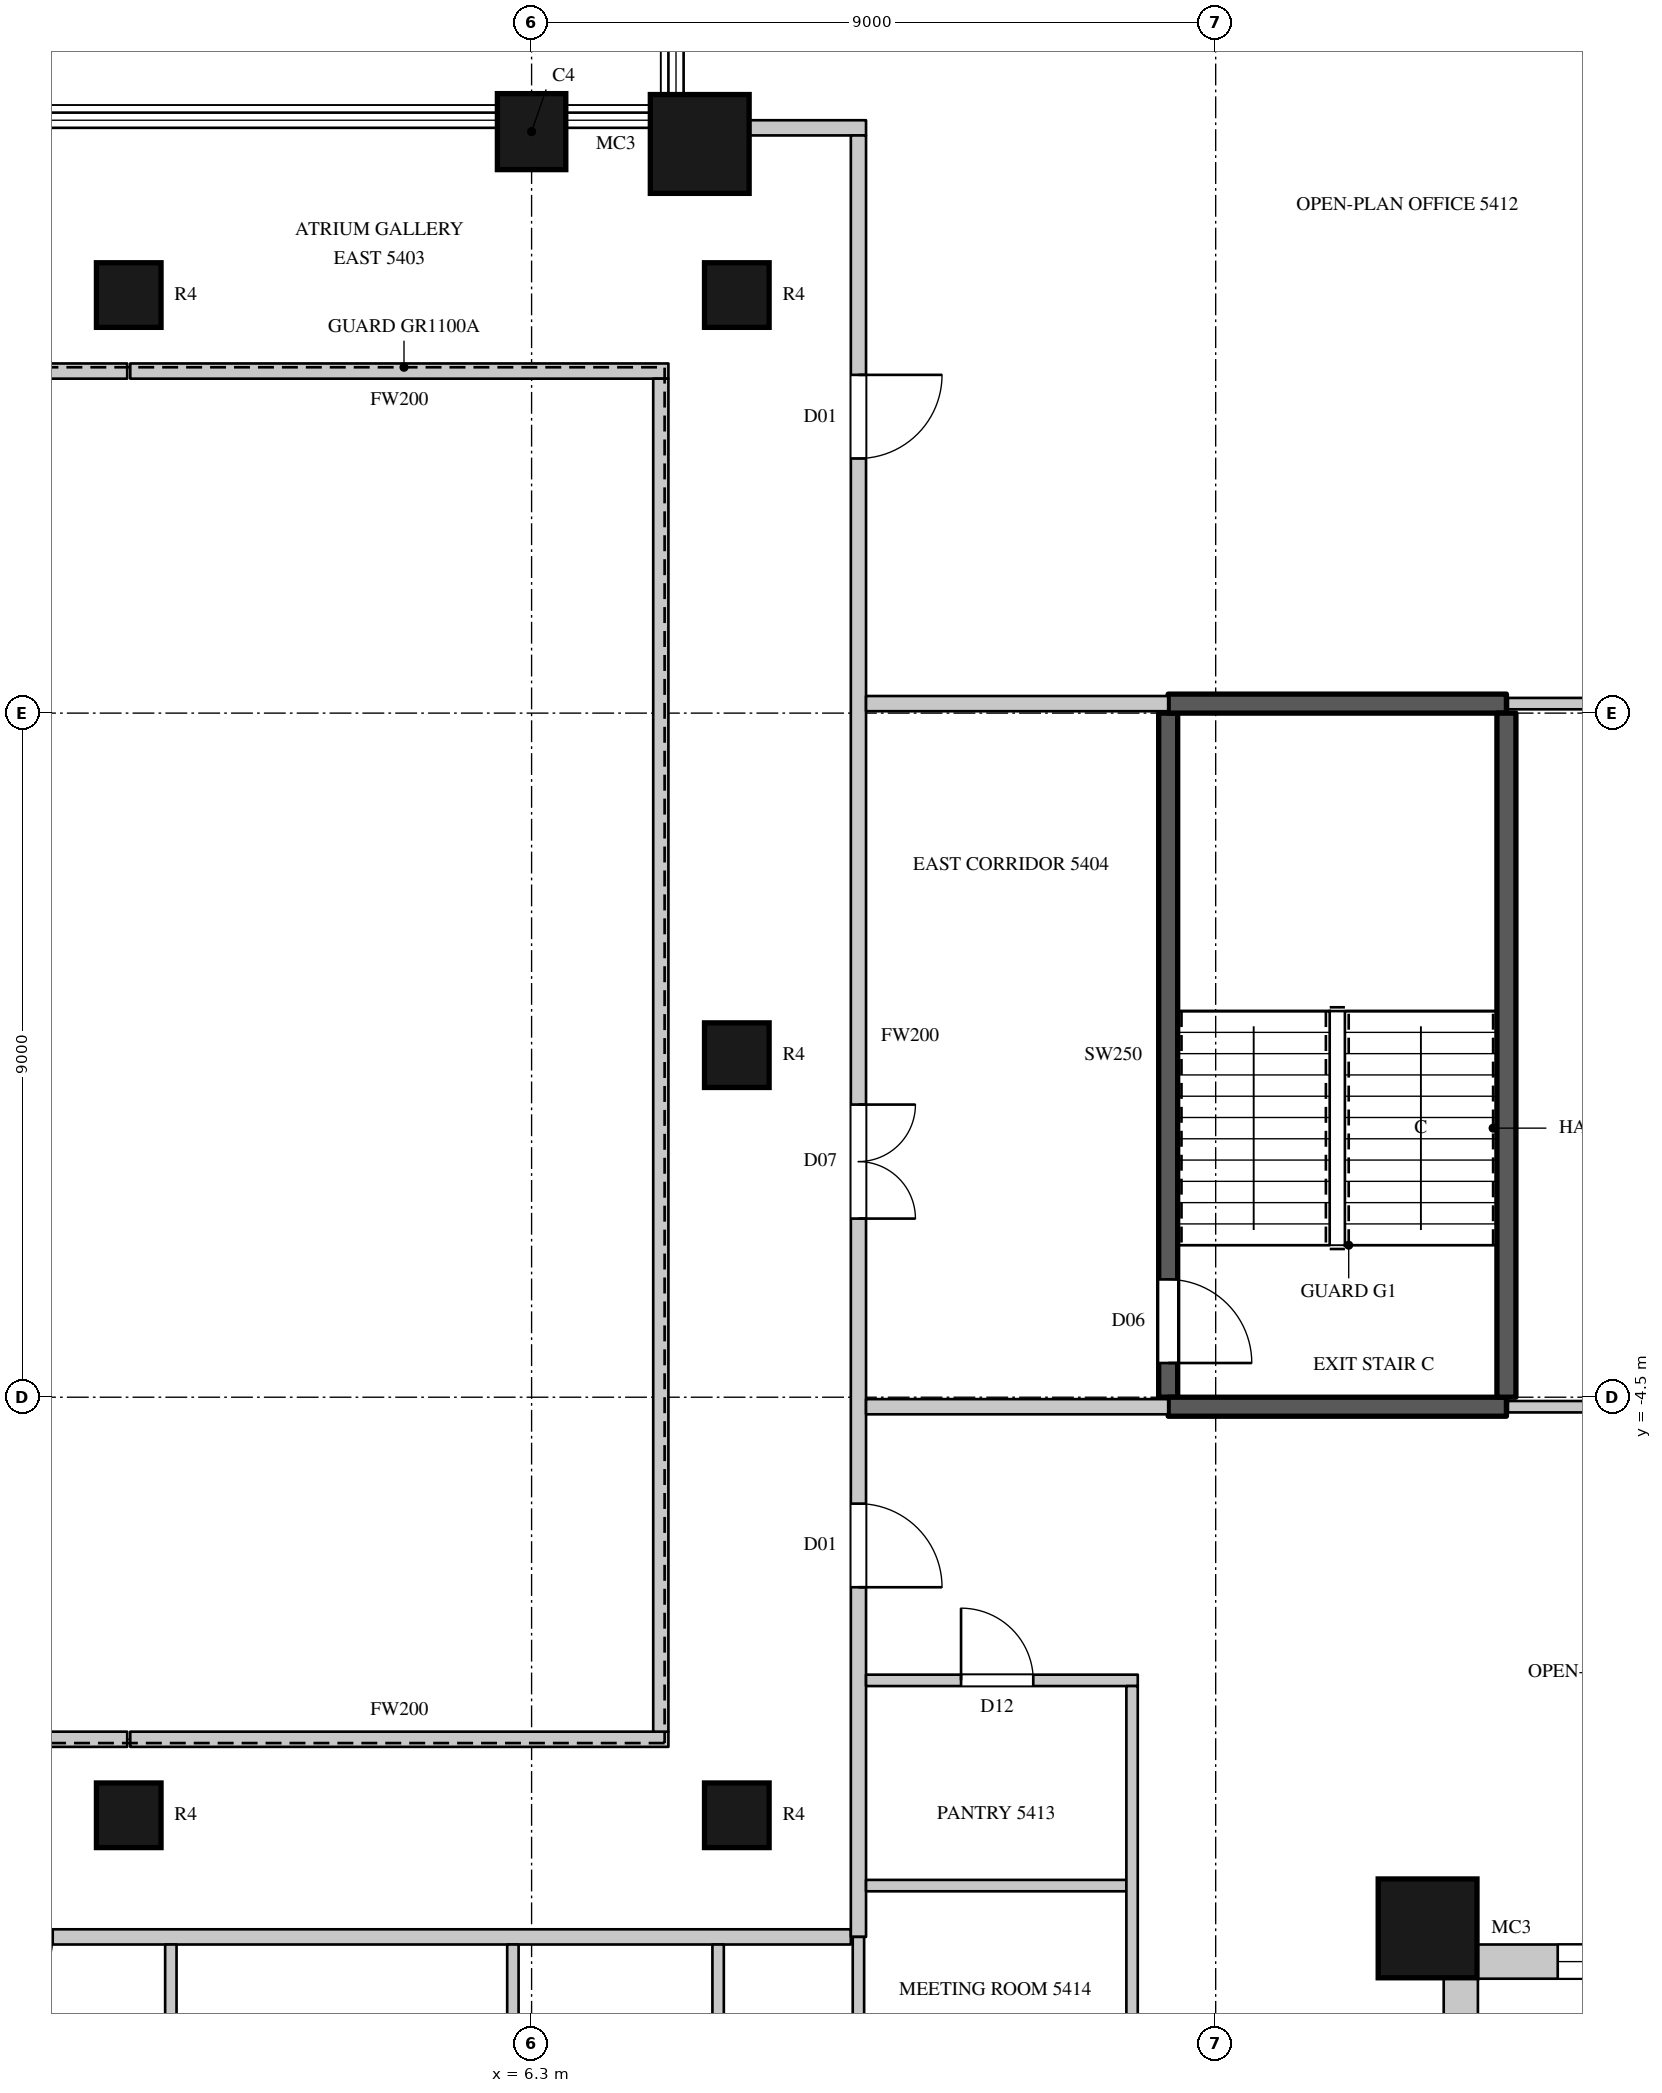
"""IFC4 building model, lengths in metres.
Left out: names, types, materials, properties, quantities, classifications, styles, units other than length and angle.
Written with IfcOpenShell. Run it as: python <this file> out.ifc"""

import sys

from ifc_helpers import new_model, si_unit, direction, frame, frame_2d, origin, origin_2d, place, context, subcontext, project, spatial, rectangle, circle, extrude, element, fill, save


model = new_model("IFC4")
c1 = context("Model", 3, precision=1e-05, world=origin(), true_north=direction((0.0, 1.0)))
c2 = subcontext(c1, "Body", "Model", "MODEL_VIEW")
j1 = project(units=[si_unit("LENGTHUNIT", "METRE"), si_unit("PLANEANGLEUNIT", "RADIAN")], contexts=[c1])
p1 = place(None, origin())
s1 = spatial("IfcSite", under=j1, at=p1, CompositionType="ELEMENT")
p2 = place(p1, origin())
s2 = spatial("IfcBuilding", under=s1, at=p2, CompositionType="ELEMENT")
p3 = place(p2, frame((0.0, 0.0, 243.4)))
s3 = spatial("IfcBuildingStorey", under=s2, at=p3, CompositionType="ELEMENT", Elevation=243.4)
p4 = place(p3, frame((8.512, 11.988, 0.0), z_axis=(0.0, 0.0, 1.0), x_axis=(1.0, 0.0, 0.0)))
e1 = element("IfcColumn", 1, at=p4, inside=s3, PredefinedType="COLUMN", context=c2, shape_type="SweptSolid", body=[
    extrude(circle(Radius=0.65, at=origin_2d()), origin(), (0.0, 0.0, 1.0), 4.1),
])
p5 = place(p3, frame((6.3, 12.15, 0.0), z_axis=(0.0, 0.0, 1.0), x_axis=(-1.0, 0.0, 0.0)))
e2 = element("IfcColumn", 2, at=p5, inside=s3, PredefinedType="COLUMN", context=c2, shape_type="SweptSolid", body=[
    extrude(rectangle(XDim=0.9, YDim=1.0, at=origin_2d()), origin(), (0.0, 0.0, 1.0), 4.1),
])
p6 = place(p3, frame((18.088, -11.488, 0.0), z_axis=(0.0, 0.0, 1.0), x_axis=(1.0, 0.0, 0.0)))
e3 = element("IfcColumn", 3, at=p6, inside=s3, PredefinedType="COLUMN", context=c2, shape_type="SweptSolid", body=[
    extrude(circle(Radius=0.65, at=origin_2d()), origin(), (0.0, 0.0, 1.0), 4.1),
])
for number, where, z_axis, x_axis in (
    (4, (1.0, -10.0, 0.0), (0.0, 0.0, 1.0), (1.0, 0.0, 0.0)),
    (5, (1.0, 10.0, 0.0), (0.0, 0.0, 1.0), (1.0, 0.0, 0.0)),
    (6, (9.0, -10.0, 0.0), (0.0, 0.0, 1.0), (1.0, 0.0, 0.0)),
    (7, (9.0, 0.0, 0.0), (0.0, 0.0, 1.0), (1.0, 0.0, 0.0)),
    (8, (9.0, 10.0, 0.0), (0.0, 0.0, 1.0), (1.0, 0.0, 0.0)),
):
    element("IfcColumn", number, at=place(p3, frame(where, z_axis=z_axis, x_axis=x_axis)), inside=s3, PredefinedType="COLUMN", context=c2, shape_type="SweptSolid", body=[
        extrude(circle(Radius=0.425, at=origin_2d()), origin(), (0.0, 0.0, 1.0), 4.1),
    ])
p7 = place(p3, frame((18.525, -16.304, 0.0), z_axis=(0.0, 0.0, 1.0), x_axis=(0.0, 1.0, 0.0)))
e9 = element("IfcWall", 9, at=p7, inside=s3, PredefinedType="SOLIDWALL", context=c2, shape_type="SweptSolid", body=[
    extrude(rectangle(XDim=4.202, YDim=0.45, at=frame_2d((2.101, 0.0))), origin(), (0.0, 0.0, 1.0), 3.8),
])
p8 = place(p7, frame((0.541, 0.0, 1.05)))
e10 = element("IfcOpeningElement", 10, at=p8, cuts=e9, PredefinedType="OPENING", context=c2, shape_type="SweptSolid", body=[
    extrude(rectangle(XDim=3.0, YDim=2.4, at=frame_2d((1.5, 1.2))), frame((0.0, 0.235, 0.0), z_axis=(0.0, -1.0, 0.0), x_axis=(1.0, 0.0, 0.0)), (0.0, 0.0, 1.0), 0.47),
])
p9 = place(p3, frame((18.701, -11.925, 0.0), z_axis=(0.0, 0.0, 1.0), x_axis=(1.0, 0.0, 0.0)))
e11 = element("IfcWall", 11, at=p9, inside=s3, PredefinedType="SOLIDWALL", context=c2, shape_type="SweptSolid", body=[
    extrude(rectangle(XDim=4.962, YDim=0.45, at=frame_2d((2.481, 0.0))), origin(), (0.0, 0.0, 1.0), 3.8),
])
p10 = place(p9, frame((1.098, 0.0, 1.05)))
e12 = element("IfcOpeningElement", 12, at=p10, cuts=e11, PredefinedType="OPENING", context=c2, shape_type="SweptSolid", body=[
    extrude(rectangle(XDim=3.0, YDim=2.4, at=frame_2d((1.5, 1.2))), frame((0.0, 0.235, 0.0), z_axis=(0.0, -1.0, 0.0), x_axis=(1.0, 0.0, 0.0)), (0.0, 0.0, 1.0), 0.47),
])
p11 = place(p3, frame((-10.9, -11.6, 0.0), z_axis=(0.0, 0.0, 1.0), x_axis=(1.0, 0.0, 0.0)))
e13 = element("IfcWall", 13, at=p11, inside=s3, PredefinedType="PARTITIONING", context=c2, shape_type="SweptSolid", body=[
    extrude(rectangle(XDim=21.4, YDim=0.2, at=frame_2d((10.7, 0.0))), origin(), (0.0, 0.0, 1.0), 3.8),
])
p12 = place(p11, frame((0.95, 0.0, 0.0)))
e14 = element("IfcOpeningElement", 14, at=p12, cuts=e13, PredefinedType="OPENING", context=c2, shape_type="SweptSolid", body=[
    extrude(rectangle(XDim=0.9, YDim=2.2, at=frame_2d((0.45, 1.1))), frame((0.0, 0.11, 0.0), z_axis=(0.0, -1.0, 0.0), x_axis=(1.0, 0.0, 0.0)), (0.0, 0.0, 1.0), 0.22),
])
p13 = place(p11, frame((4.2, 0.0, 0.0)))
e15 = element("IfcOpeningElement", 15, at=p13, cuts=e13, PredefinedType="OPENING", context=c2, shape_type="SweptSolid", body=[
    extrude(rectangle(XDim=0.9, YDim=2.2, at=frame_2d((0.45, 1.1))), frame((0.0, 0.11, 0.0), z_axis=(0.0, -1.0, 0.0), x_axis=(1.0, 0.0, 0.0)), (0.0, 0.0, 1.0), 0.22),
])
p14 = place(p11, frame((6.85, 0.0, 0.0)))
e16 = element("IfcOpeningElement", 16, at=p14, cuts=e13, PredefinedType="OPENING", context=c2, shape_type="SweptSolid", body=[
    extrude(rectangle(XDim=1.1, YDim=2.4, at=frame_2d((0.55, 1.2))), frame((0.0, 0.11, 0.0), z_axis=(0.0, -1.0, 0.0), x_axis=(1.0, 0.0, 0.0)), (0.0, 0.0, 1.0), 0.22),
])
p15 = place(p11, frame((9.8, 0.0, 0.0)))
e17 = element("IfcOpeningElement", 17, at=p15, cuts=e13, PredefinedType="OPENING", context=c2, shape_type="SweptSolid", body=[
    extrude(rectangle(XDim=1.1, YDim=2.4, at=frame_2d((0.55, 1.2))), frame((0.0, 0.11, 0.0), z_axis=(0.0, -1.0, 0.0), x_axis=(1.0, 0.0, 0.0)), (0.0, 0.0, 1.0), 0.22),
])
for number, where, z_axis, x_axis in (
    (18, (-6.1, -9.0, 0.0), (0.0, 0.0, 1.0), (1.0, 0.0, 0.0)),
    (19, (-6.1, 9.0, 0.0), (0.0, 0.0, 1.0), (1.0, 0.0, 0.0)),
    (20, (1.02, -9.0, 0.0), (0.0, 0.0, 1.0), (1.0, 0.0, 0.0)),
    (21, (1.02, 9.0, 0.0), (0.0, 0.0, 1.0), (1.0, 0.0, 0.0)),
):
    element("IfcWall", number, at=place(p3, frame(where, z_axis=z_axis, x_axis=x_axis)), inside=s3, PredefinedType="PARTITIONING", context=c2, shape_type="SweptSolid", body=[
        extrude(rectangle(XDim=7.08, YDim=0.2, at=frame_2d((3.54, 0.0))), origin(), (0.0, 0.0, 1.0), 3.8),
    ])
p16 = place(p3, frame((8.0, -8.9, 0.0), z_axis=(0.0, 0.0, 1.0), x_axis=(0.0, 1.0, 0.0)))
e22 = element("IfcWall", 22, at=p16, inside=s3, PredefinedType="PARTITIONING", context=c2, shape_type="SweptSolid", body=[
    extrude(rectangle(XDim=17.8, YDim=0.2, at=frame_2d((8.9, 0.0))), origin(), (0.0, 0.0, 1.0), 3.8),
])
p17 = place(p3, frame((9.144, 12.2, 0.0), z_axis=(0.0, 0.0, 1.0), x_axis=(1.0, 0.0, 0.0)))
e23 = element("IfcWall", 23, at=p17, inside=s3, PredefinedType="PARTITIONING", context=c2, shape_type="SweptSolid", body=[
    extrude(rectangle(XDim=1.556, YDim=0.2, at=frame_2d((0.778, 0.0))), origin(), (0.0, 0.0, 1.0), 3.8),
])
p18 = place(p3, frame((10.6, -11.6, 0.0), z_axis=(0.0, 0.0, 1.0), x_axis=(0.0, 1.0, 0.0)))
e24 = element("IfcWall", 24, at=p18, inside=s3, PredefinedType="PARTITIONING", context=c2, shape_type="SweptSolid", body=[
    extrude(rectangle(XDim=23.7, YDim=0.2, at=frame_2d((11.85, 0.0))), origin(), (0.0, 0.0, 1.0), 3.8),
])
p19 = place(p18, frame((9.45, 0.0, 0.0)))
e25 = element("IfcOpeningElement", 25, at=p19, cuts=e24, PredefinedType="OPENING", context=c2, shape_type="SweptSolid", body=[
    extrude(rectangle(XDim=1.5, YDim=2.4, at=frame_2d((0.75, 1.2))), frame((0.0, 0.11, 0.0), z_axis=(0.0, -1.0, 0.0), x_axis=(1.0, 0.0, 0.0)), (0.0, 0.0, 1.0), 0.22),
])
p20 = place(p18, frame((19.45, 0.0, 0.0)))
e26 = element("IfcOpeningElement", 26, at=p20, cuts=e24, PredefinedType="OPENING", context=c2, shape_type="SweptSolid", body=[
    extrude(rectangle(XDim=1.1, YDim=2.4, at=frame_2d((0.55, 1.2))), frame((0.0, 0.11, 0.0), z_axis=(0.0, -1.0, 0.0), x_axis=(1.0, 0.0, 0.0)), (0.0, 0.0, 1.0), 0.22),
])
p21 = place(p18, frame((4.6, 0.0, 0.0)))
e27 = element("IfcOpeningElement", 27, at=p21, cuts=e24, PredefinedType="OPENING", context=c2, shape_type="SweptSolid", body=[
    extrude(rectangle(XDim=1.1, YDim=2.4, at=frame_2d((0.55, 1.2))), frame((0.0, 0.11, 0.0), z_axis=(0.0, -1.0, 0.0), x_axis=(1.0, 0.0, 0.0)), (0.0, 0.0, 1.0), 0.22),
])
for number, where, z_axis, x_axis in (
    (28, (10.7, -4.625, 0.0), (0.0, 0.0, 1.0), (1.0, 0.0, 0.0)),
    (29, (10.7, 4.625, 0.0), (0.0, 0.0, 1.0), (1.0, 0.0, 0.0)),
):
    element("IfcWall", number, at=place(p3, frame(where, z_axis=z_axis, x_axis=x_axis)), inside=s3, PredefinedType="PARTITIONING", context=c2, shape_type="SweptSolid", body=[
        extrude(rectangle(XDim=3.975, YDim=0.2, at=frame_2d((1.988, 0.0))), origin(), (0.0, 0.0, 1.0), 3.8),
    ])
p22 = place(p3, frame((1.554, -15.425, 0.0), z_axis=(0.0, 0.0, 1.0), x_axis=(0.0, 1.0, 0.0)))
e30 = element("IfcWall", 30, at=p22, inside=s3, PredefinedType="PARTITIONING", context=c2, shape_type="SweptSolid", body=[
    extrude(rectangle(XDim=3.725, YDim=0.15, at=frame_2d((1.863, 0.0))), origin(), (0.0, 0.0, 1.0), 3.8),
])
p23 = place(p22, frame((0.15, 0.0, 0.0)))
e31 = element("IfcOpeningElement", 31, at=p23, cuts=e30, PredefinedType="OPENING", context=c2, shape_type="SweptSolid", body=[
    extrude(rectangle(XDim=0.95, YDim=2.2, at=frame_2d((0.475, 1.1))), frame((0.0, 0.085, 0.0), z_axis=(0.0, -1.0, 0.0), x_axis=(1.0, 0.0, 0.0)), (0.0, 0.0, 1.0), 0.17),
])
for number, where, z_axis, x_axis in (
    (32, (6.054, -15.425, 0.0), (0.0, 0.0, 1.0), (0.0, 1.0, 0.0)),
    (33, (8.754, -15.425, 0.0), (0.0, 0.0, 1.0), (0.0, 1.0, 0.0)),
):
    element("IfcWall", number, at=place(p3, frame(where, z_axis=z_axis, x_axis=x_axis)), inside=s3, PredefinedType="PARTITIONING", context=c2, shape_type="SweptSolid", body=[
        extrude(rectangle(XDim=3.725, YDim=0.15, at=frame_2d((1.863, 0.0))), origin(), (0.0, 0.0, 1.0), 3.8),
    ])
p24 = place(p3, frame((10.6, -20.864, 0.0), z_axis=(0.0, 0.0, 1.0), x_axis=(0.0, 1.0, 0.0)))
e34 = element("IfcWall", 34, at=p24, inside=s3, PredefinedType="PARTITIONING", context=c2, shape_type="SweptSolid", body=[
    extrude(rectangle(XDim=9.264, YDim=0.15, at=frame_2d((4.632, 0.0))), origin(), (0.0, 0.0, 1.0), 3.8),
])
p25 = place(p3, frame((10.7, -10.925, 0.0), z_axis=(0.0, 0.0, 1.0), x_axis=(1.0, 0.0, 0.0)))
e35 = element("IfcWall", 35, at=p25, inside=s3, PredefinedType="PARTITIONING", context=c2, shape_type="SweptSolid", body=[
    extrude(rectangle(XDim=3.425, YDim=0.15, at=frame_2d((1.712, 0.0))), origin(), (0.0, 0.0, 1.0), 3.8),
])
p26 = place(p3, frame((10.7, -8.225, 0.0), z_axis=(0.0, 0.0, 1.0), x_axis=(1.0, 0.0, 0.0)))
e36 = element("IfcWall", 36, at=p26, inside=s3, PredefinedType="PARTITIONING", context=c2, shape_type="SweptSolid", body=[
    extrude(rectangle(XDim=3.575, YDim=0.15, at=frame_2d((1.788, 0.0))), origin(), (0.0, 0.0, 1.0), 3.15),
])
p27 = place(p26, frame((1.25, 0.0, 0.0)))
e37 = element("IfcOpeningElement", 37, at=p27, cuts=e36, PredefinedType="OPENING", context=c2, shape_type="SweptSolid", body=[
    extrude(rectangle(XDim=0.95, YDim=2.2, at=frame_2d((0.475, 1.1))), frame((0.0, 0.085, 0.0), z_axis=(0.0, -1.0, 0.0), x_axis=(1.0, 0.0, 0.0)), (0.0, 0.0, 1.0), 0.17),
])
p28 = place(p3, frame((14.2, -14.45, 0.0), z_axis=(0.0, 0.0, 1.0), x_axis=(0.0, 1.0, 0.0)))
e38 = element("IfcWall", 38, at=p28, inside=s3, PredefinedType="PARTITIONING", context=c2, shape_type="SweptSolid", body=[
    extrude(rectangle(XDim=6.15, YDim=0.15, at=frame_2d((3.075, 0.0))), origin(), (0.0, 0.0, 1.0), 3.8),
])
for number, where, z_axis, x_axis in (
    (39, (19.145, -4.625, 0.0), (0.0, 0.0, 1.0), (1.0, 0.0, 0.0)),
    (40, (19.145, 4.625, 0.0), (0.0, 0.0, 1.0), (1.0, 0.0, 0.0)),
):
    element("IfcWall", number, at=place(p3, frame(where, z_axis=z_axis, x_axis=x_axis)), inside=s3, PredefinedType="PARTITIONING", context=c2, shape_type="SweptSolid", body=[
        extrude(rectangle(XDim=4.605, YDim=0.15, at=frame_2d((2.302, 0.0))), origin(), (0.0, 0.0, 1.0), 3.8),
    ])
p29 = place(p3, frame((14.675, -4.5, 0.0), z_axis=(0.0, 0.0, 1.0), x_axis=(0.0, 1.0, 0.0)))
e41 = element("IfcWall", 41, at=p29, inside=s3, PredefinedType="SHEAR", context=c2, shape_type="SweptSolid", body=[
    extrude(rectangle(XDim=9.0, YDim=0.25, at=frame_2d((4.5, 0.0))), origin(), (0.0, 0.0, 1.0), 3.8),
])
p30 = place(p29, frame((0.45, 0.0, 0.0)))
e42 = element("IfcOpeningElement", 42, at=p30, cuts=e41, PredefinedType="OPENING", context=c2, shape_type="SweptSolid", body=[
    extrude(rectangle(XDim=1.1, YDim=2.2, at=frame_2d((0.55, 1.1))), frame((0.0, 0.135, 0.0), z_axis=(0.0, -1.0, 0.0), x_axis=(1.0, 0.0, 0.0)), (0.0, 0.0, 1.0), 0.27),
])
for number, where, z_axis, x_axis in (
    (43, (14.675, -4.625, 0.0), (0.0, 0.0, 1.0), (1.0, 0.0, 0.0)),
    (44, (14.675, 4.625, 0.0), (0.0, 0.0, 1.0), (1.0, 0.0, 0.0)),
):
    element("IfcWall", number, at=place(p3, frame(where, z_axis=z_axis, x_axis=x_axis)), inside=s3, PredefinedType="SHEAR", context=c2, shape_type="SweptSolid", body=[
        extrude(rectangle(XDim=4.45, YDim=0.25, at=frame_2d((2.225, 0.0))), origin(), (0.0, 0.0, 1.0), 3.8),
    ])
p31 = place(p3, frame((19.125, -4.5, 0.0), z_axis=(0.0, 0.0, 1.0), x_axis=(0.0, 1.0, 0.0)))
e45 = element("IfcWall", 45, at=p31, inside=s3, PredefinedType="SHEAR", context=c2, shape_type="SweptSolid", body=[
    extrude(rectangle(XDim=9.0, YDim=0.25, at=frame_2d((4.5, 0.0))), origin(), (0.0, 0.0, 1.0), 3.8),
])
p32 = place(p10, origin())
e46 = element("IfcWindow", 46, at=p32, inside=s3, PartitioningType="SINGLE_PANEL", PredefinedType="WINDOW", context=c2, shape_type="SweptSolid", body=[
    extrude(rectangle(XDim=3.0, YDim=2.4, at=frame_2d((1.5, 1.2))), frame((0.0, 0.135, 0.0), z_axis=(0.0, -1.0, 0.0), x_axis=(1.0, 0.0, 0.0)), (0.0, 0.0, 1.0), 0.06),
])
fill(e12, e46)
p33 = place(p19, origin())
e47 = element("IfcDoor", 47, at=p33, inside=s3, OperationType="DOUBLE_DOOR_SINGLE_SWING", PredefinedType="DOOR", context=c2, shape_type="SweptSolid", body=[
    extrude(rectangle(XDim=1.5, YDim=2.4, at=frame_2d((0.75, 1.2))), frame((0.0, 0.025, 0.0), z_axis=(0.0, -1.0, 0.0), x_axis=(1.0, 0.0, 0.0)), (0.0, 0.0, 1.0), 0.05),
])
fill(e25, e47)
p34 = place(p15, origin())
e48 = element("IfcDoor", 48, at=p34, inside=s3, OperationType="SINGLE_SWING_RIGHT", PredefinedType="DOOR", context=c2, shape_type="SweptSolid", body=[
    extrude(rectangle(XDim=1.1, YDim=2.4, at=frame_2d((0.55, 1.2))), frame((0.0, 0.025, 0.0), z_axis=(0.0, -1.0, 0.0), x_axis=(1.0, 0.0, 0.0)), (0.0, 0.0, 1.0), 0.05),
])
fill(e17, e48)
p35 = place(p20, origin())
e49 = element("IfcDoor", 49, at=p35, inside=s3, OperationType="SINGLE_SWING_LEFT", PredefinedType="DOOR", context=c2, shape_type="SweptSolid", body=[
    extrude(rectangle(XDim=1.1, YDim=2.4, at=frame_2d((0.55, 1.2))), frame((0.0, 0.025, 0.0), z_axis=(0.0, -1.0, 0.0), x_axis=(1.0, 0.0, 0.0)), (0.0, 0.0, 1.0), 0.05),
])
fill(e26, e49)
p36 = place(p21, origin())
e50 = element("IfcDoor", 50, at=p36, inside=s3, OperationType="SINGLE_SWING_RIGHT", PredefinedType="DOOR", context=c2, shape_type="SweptSolid", body=[
    extrude(rectangle(XDim=1.1, YDim=2.4, at=frame_2d((0.55, 1.2))), frame((0.0, 0.025, 0.0), z_axis=(0.0, -1.0, 0.0), x_axis=(1.0, 0.0, 0.0)), (0.0, 0.0, 1.0), 0.05),
])
fill(e27, e50)
p37 = place(p27, origin())
e51 = element("IfcDoor", 51, at=p37, inside=s3, OperationType="SINGLE_SWING_LEFT", PredefinedType="DOOR", context=c2, shape_type="SweptSolid", body=[
    extrude(rectangle(XDim=0.95, YDim=2.2, at=frame_2d((0.475, 1.1))), frame((0.0, 0.025, 0.0), z_axis=(0.0, -1.0, 0.0), x_axis=(1.0, 0.0, 0.0)), (0.0, 0.0, 1.0), 0.05),
])
fill(e37, e51)
p38 = place(p30, origin())
e52 = element("IfcDoor", 52, at=p38, inside=s3, OperationType="SINGLE_SWING_RIGHT", PredefinedType="DOOR", context=c2, shape_type="SweptSolid", body=[
    extrude(rectangle(XDim=1.1, YDim=2.2, at=frame_2d((0.55, 1.1))), frame((0.0, 0.025, 0.0), z_axis=(0.0, -1.0, 0.0), x_axis=(1.0, 0.0, 0.0)), (0.0, 0.0, 1.0), 0.05),
])
fill(e42, e52)
save(model, sys.argv[1])
